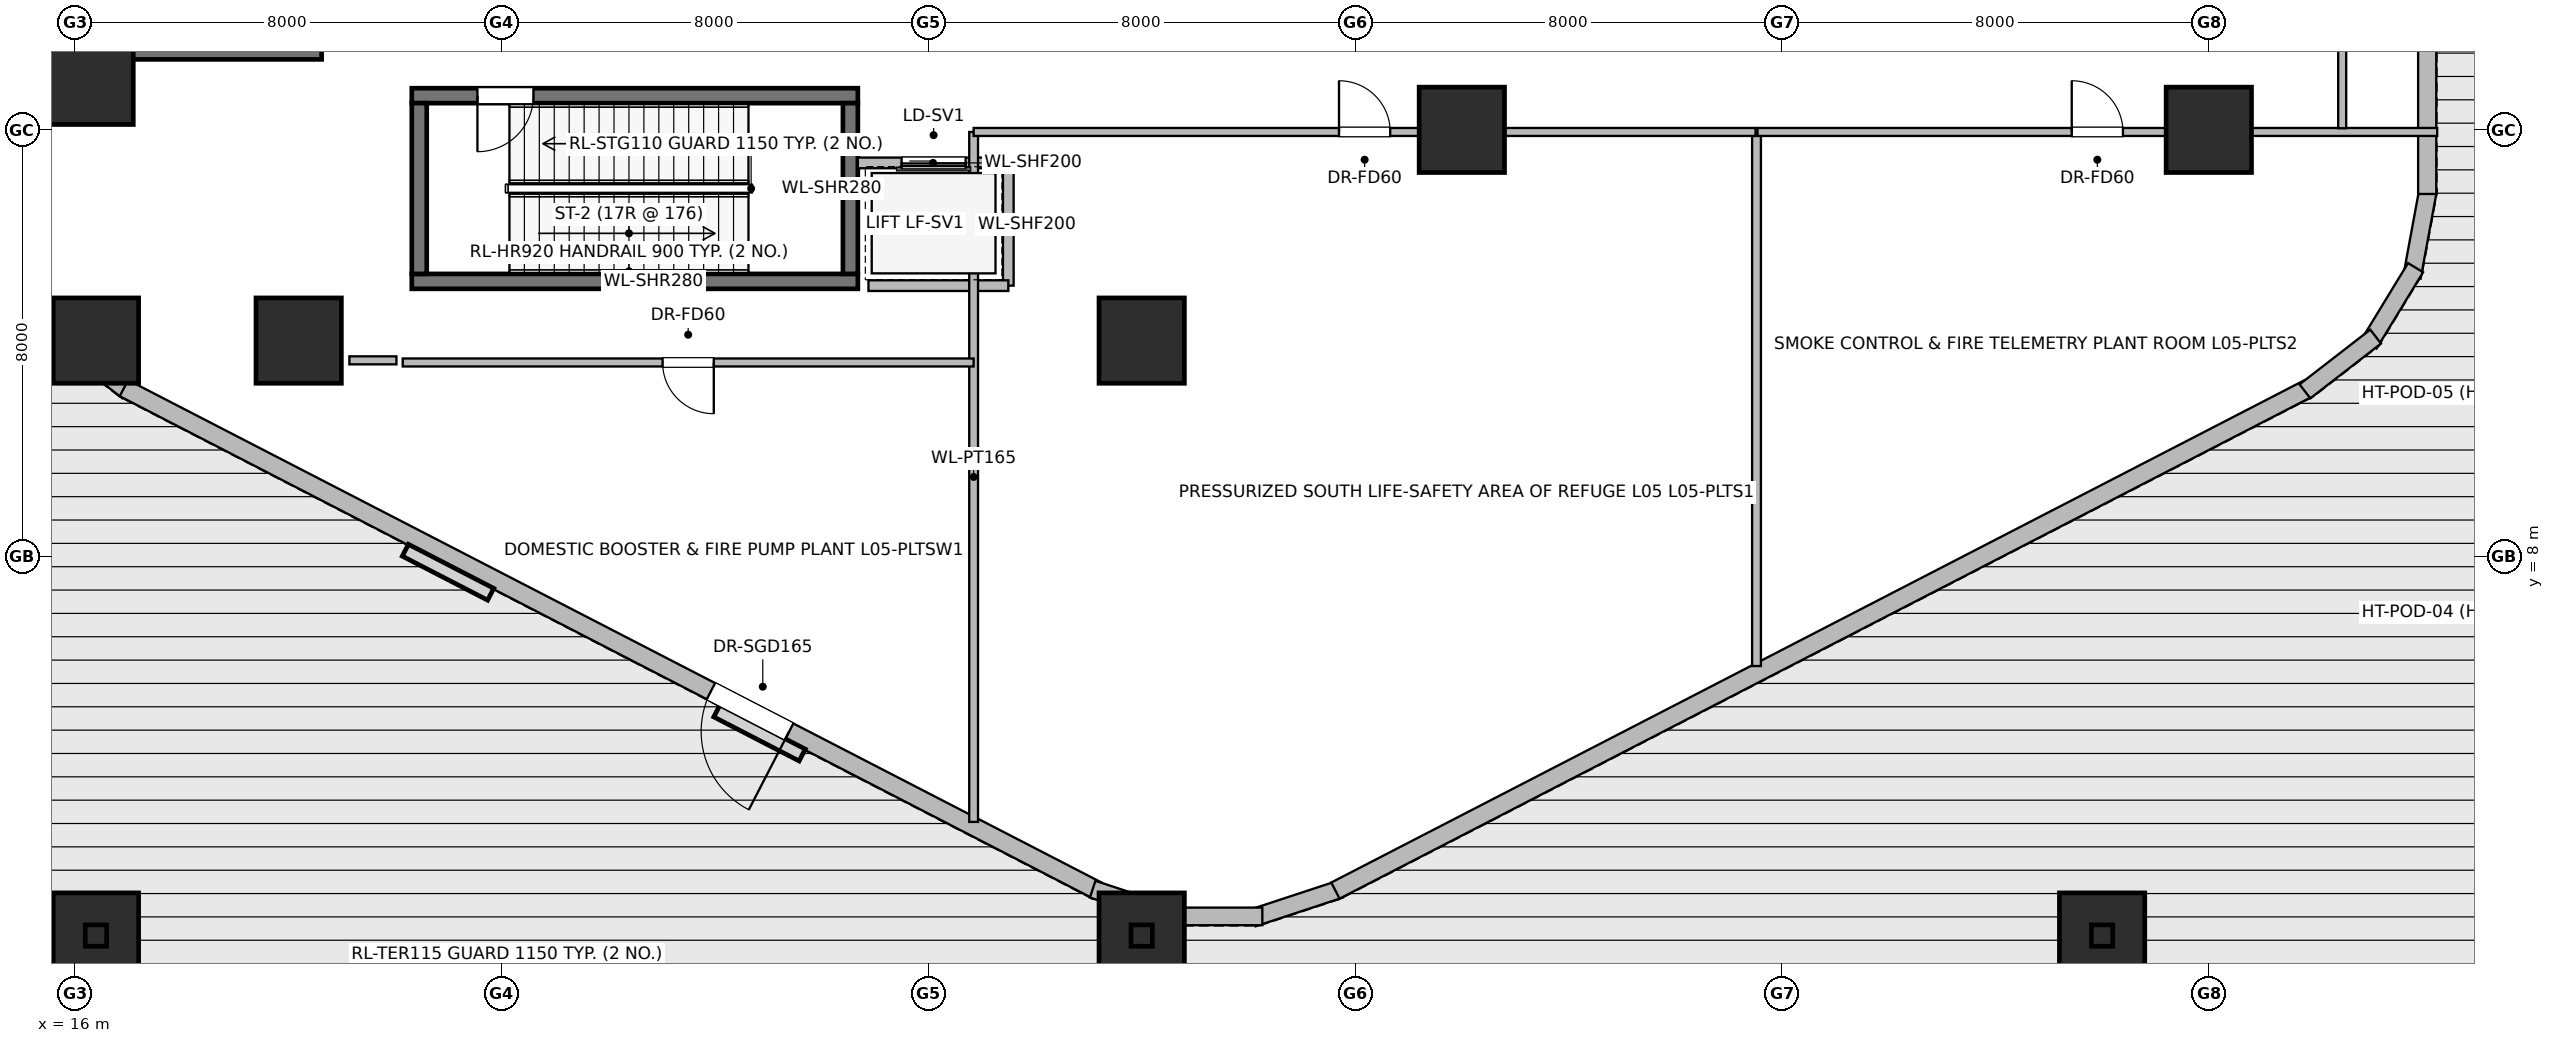
"""IFC4 building model, lengths in metres.
Left out: names, types, materials, properties, quantities, classifications, styles, units other than length and angle.
Written with IfcOpenShell. Run it as: python <this file> out.ifc"""

import sys

from ifc_helpers import new_model, si_unit, direction, frame, frame_2d, origin, origin_2d, place, context, subcontext, project, spatial, rectangle, hollow_rectangle, extrude, element, fill, save


model = new_model("IFC4")
c1 = context("Model", 3, precision=1e-05, world=origin(), true_north=direction((0.0, 1.0)))
c2 = subcontext(c1, "Body", "Model", "MODEL_VIEW")
j1 = project(units=[si_unit("LENGTHUNIT", "METRE"), si_unit("PLANEANGLEUNIT", "RADIAN")], contexts=[c1])
p1 = place(None, origin())
s1 = spatial("IfcSite", under=j1, at=p1, CompositionType="ELEMENT")
p2 = place(p1, origin())
s2 = spatial("IfcBuilding", under=s1, at=p2, CompositionType="ELEMENT")
p3 = place(p2, frame((0.0, 0.0, 21.0)))
s3 = spatial("IfcBuildingStorey", under=s2, at=p3, CompositionType="ELEMENT", Elevation=21.0)
p4 = place(p3, frame((16.87, 17.46, 0.0), z_axis=(0.0, 0.0, 1.0), x_axis=(1.0, 0.0, 0.0)))
e1 = element("IfcWall", 1, at=p4, inside=s3, PredefinedType="SHEAR", context=c2, shape_type="SweptSolid", body=[
    extrude(rectangle(XDim=3.76, YDim=0.28, at=frame_2d((1.88, 0.0))), origin(), (0.0, 0.0, 1.0), 6.0),
])
p5 = place(p3, frame((22.32, 13.16, 0.0), z_axis=(0.0, 0.0, 1.0), x_axis=(1.0, 0.0, 0.0)))
e2 = element("IfcWall", 2, at=p5, inside=s3, PredefinedType="SHEAR", context=c2, shape_type="SweptSolid", body=[
    extrude(rectangle(XDim=8.36, YDim=0.28, at=frame_2d((4.18, 0.0))), origin(), (0.0, 0.0, 1.0), 6.0),
])
p6 = place(p3, frame((30.68, 16.64, 0.0), z_axis=(0.0, 0.0, 1.0), x_axis=(-1.0, 0.0, 0.0)))
e3 = element("IfcWall", 3, at=p6, inside=s3, PredefinedType="SHEAR", context=c2, shape_type="SweptSolid", body=[
    extrude(rectangle(XDim=8.36, YDim=0.28, at=frame_2d((4.18, 0.0))), origin(), (0.0, 0.0, 1.0), 6.0),
])
p7 = place(p6, frame((6.08, 0.0, 0.0)))
e4 = element("IfcOpeningElement", 4, at=p7, cuts=e3, PredefinedType="OPENING", context=c2, shape_type="SweptSolid", body=[
    extrude(rectangle(XDim=1.05, YDim=2.0, at=frame_2d((0.525, 1.0))), frame((0.0, 0.15, 0.0), z_axis=(0.0, -1.0, 0.0), x_axis=(1.0, 0.0, 0.0)), (0.0, 0.0, 1.0), 0.3),
])
for number, where, z_axis, x_axis in (
    (5, (22.46, 16.5, 0.0), (0.0, 0.0, 1.0), (0.0, -1.0, 0.0)),
    (6, (30.54, 13.3, 0.0), (0.0, 0.0, 1.0), (0.0, 1.0, 0.0)),
):
    element("IfcWall", number, at=place(p3, frame(where, z_axis=z_axis, x_axis=x_axis)), inside=s3, PredefinedType="SHEAR", context=c2, shape_type="SweptSolid", body=[
        extrude(rectangle(XDim=3.2, YDim=0.28, at=frame_2d((1.6, 0.0))), origin(), (0.0, 0.0, 1.0), 6.0),
    ])
p8 = place(p3, frame((16.3, 16.9, 0.0), z_axis=(0.0, 0.0, 1.0), x_axis=(1.0, 0.0, 0.0)))
e7 = element("IfcColumn", 7, at=p8, inside=s3, PredefinedType="COLUMN", context=c2, shape_type="SweptSolid", body=[
    extrude(rectangle(XDim=1.6, YDim=1.6, at=origin_2d()), origin(), (0.0, 0.0, 1.0), 6.0),
])
for number, where, z_axis, x_axis in (
    (8, (16.4, 0.9, 0.0), (0.0, 0.0, 1.0), (1.0, 0.0, 0.0)),
    (9, (36.0, 0.9, 0.0), (0.0, 0.0, 1.0), (1.0, 0.0, 0.0)),
    (10, (54.0, 0.9, 0.0), (0.0, 0.0, 1.0), (1.0, 0.0, 0.0)),
    (11, (42.0, 16.0, 0.0), (0.0, 0.0, 1.0), (1.0, 0.0, 0.0)),
    (12, (56.0, 16.0, 0.0), (0.0, 0.0, 1.0), (1.0, 0.0, 0.0)),
    (13, (20.2, 12.05, 0.0), (0.0, 0.0, 1.0), (1.0, 0.0, 0.0)),
    (14, (16.4, 12.05, 0.0), (0.0, 0.0, 1.0), (1.0, 0.0, 0.0)),
    (15, (36.0, 12.05, 0.0), (0.0, 0.0, 1.0), (1.0, 0.0, 0.0)),
):
    element("IfcColumn", number, at=place(p3, frame(where, z_axis=z_axis, x_axis=x_axis)), inside=s3, PredefinedType="COLUMN", context=c2, shape_type="SweptSolid", body=[
        extrude(rectangle(XDim=1.6, YDim=1.6, at=origin_2d()), origin(), (0.0, 0.0, 1.0), 5.5),
    ])
for number, where, z_axis, x_axis in (
    (16, (16.4, 0.9, 5.55), (0.0, 0.0, 1.0), (1.0, 0.0, 0.0)),
    (17, (36.0, 0.9, 5.55), (0.0, 0.0, 1.0), (1.0, 0.0, 0.0)),
    (18, (54.0, 0.9, 5.55), (0.0, 0.0, 1.0), (1.0, 0.0, 0.0)),
):
    element("IfcColumn", number, at=place(p3, frame(where, z_axis=z_axis, x_axis=x_axis)), inside=s3, PredefinedType="USERDEFINED", context=c2, shape_type="SweptSolid", body=[
        extrude(hollow_rectangle(XDim=0.4, YDim=0.4, WallThickness=0.022, at=origin_2d()), origin(), (0.0, 0.0, 1.0), 3.25),
    ])
p9 = place(p3, frame((16.998, 11.099, 0.0), z_axis=(0.0, 0.0, 1.0), x_axis=(-0.790691856293, 0.61221433207, 0.0)))
e19 = element("IfcWall", 19, at=p9, inside=s3, PredefinedType="STANDARD", context=c2, shape_type="SweptSolid", body=[
    extrude(rectangle(XDim=1.676, YDim=0.33, at=frame_2d((0.838, 0.0))), origin(), (0.0, 0.0, 1.0), 3.6),
])
p10 = place(p3, frame((15.798, 11.985, 0.0), z_axis=(0.0, 0.0, 1.0), x_axis=(-0.520584129191, 0.853810379671, 0.0)))
e20 = element("IfcWall", 20, at=p10, inside=s3, PredefinedType="STANDARD", context=c2, shape_type="SweptSolid", body=[
    extrude(rectangle(XDim=1.677, YDim=0.33, at=frame_2d((0.838, 0.0))), origin(), (0.0, 0.0, 1.0), 3.6),
])
p11 = place(p3, frame((35.169, 1.743, 0.0), z_axis=(0.0, 0.0, 1.0), x_axis=(-0.888634413993, 0.458616264721, 0.0)))
e21 = element("IfcWall", 21, at=p11, inside=s3, PredefinedType="STANDARD", context=c2, shape_type="SweptSolid", body=[
    extrude(rectangle(XDim=20.531, YDim=0.34, at=frame_2d((10.266, 0.0))), origin(), (0.0, 0.0, 1.0), 3.6),
])
p12 = place(p11, frame((6.5, 0.0, 0.0)))
e22 = element("IfcOpeningElement", 22, at=p12, cuts=e21, PredefinedType="OPENING", context=c2, shape_type="SweptSolid", body=[
    extrude(rectangle(XDim=1.65, YDim=2.25, at=frame_2d((0.825, 1.125))), frame((0.0, 0.18, 0.0), z_axis=(0.0, -1.0, 0.0), x_axis=(1.0, 0.0, 0.0)), (0.0, 0.0, 1.0), 0.36),
])
p13 = place(p3, frame((39.719, 1.769, 0.0), z_axis=(0.0, 0.0, 1.0), x_axis=(-0.94976901097, -0.312951794691, 0.0)))
e23 = element("IfcWall", 23, at=p13, inside=s3, PredefinedType="STANDARD", context=c2, shape_type="SweptSolid", body=[
    extrude(rectangle(XDim=1.722, YDim=0.33, at=frame_2d((0.861, 0.0))), origin(), (0.0, 0.0, 1.0), 3.6),
])
p14 = place(p3, frame((38.261, 1.259, 0.0), z_axis=(0.0, 0.0, 1.0), x_axis=(-1.0, 0.0, 0.0)))
e24 = element("IfcWall", 24, at=p14, inside=s3, PredefinedType="STANDARD", context=c2, shape_type="SweptSolid", body=[
    extrude(rectangle(XDim=1.722, YDim=0.33, at=frame_2d((0.861, 0.0))), origin(), (0.0, 0.0, 1.0), 3.6),
])
p15 = place(p3, frame((36.717, 1.23, 0.0), z_axis=(0.0, 0.0, 1.0), x_axis=(-0.94976901097, 0.312951794691, 0.0)))
e25 = element("IfcWall", 25, at=p15, inside=s3, PredefinedType="STANDARD", context=c2, shape_type="SweptSolid", body=[
    extrude(rectangle(XDim=1.722, YDim=0.33, at=frame_2d((0.861, 0.0))), origin(), (0.0, 0.0, 1.0), 3.6),
])
p16 = place(p3, frame((57.876, 11.159, 0.0), z_axis=(0.0, 0.0, 1.0), x_axis=(-0.888634413993, -0.458616264721, 0.0)))
e26 = element("IfcWall", 26, at=p16, inside=s3, PredefinedType="STANDARD", context=c2, shape_type="SweptSolid", body=[
    extrude(rectangle(XDim=20.531, YDim=0.34, at=frame_2d((10.266, 0.0))), origin(), (0.0, 0.0, 1.0), 3.6),
])
p17 = place(p3, frame((60.113, 14.892, 0.0), z_axis=(0.0, 0.0, 1.0), x_axis=(-0.181714143354, -0.983351397063, 0.0)))
e27 = element("IfcWall", 27, at=p17, inside=s3, PredefinedType="STANDARD", context=c2, shape_type="SweptSolid", body=[
    extrude(rectangle(XDim=1.678, YDim=0.33, at=frame_2d((0.839, 0.0))), origin(), (0.0, 0.0, 1.0), 5.58),
])
p18 = place(p3, frame((59.875, 13.417, 0.0), z_axis=(0.0, 0.0, 1.0), x_axis=(-0.520584129191, -0.853810379671, 0.0)))
e28 = element("IfcWall", 28, at=p18, inside=s3, PredefinedType="STANDARD", context=c2, shape_type="SweptSolid", body=[
    extrude(rectangle(XDim=1.677, YDim=0.33, at=frame_2d((0.838, 0.0))), origin(), (0.0, 0.0, 1.0), 5.58),
])
p19 = place(p3, frame((59.127, 12.125, 0.0), z_axis=(0.0, 0.0, 1.0), x_axis=(-0.790691856293, -0.61221433207, 0.0)))
e29 = element("IfcWall", 29, at=p19, inside=s3, PredefinedType="STANDARD", context=c2, shape_type="SweptSolid", body=[
    extrude(rectangle(XDim=1.676, YDim=0.33, at=frame_2d((0.838, 0.0))), origin(), (0.0, 0.0, 1.0), 5.58),
])
p20 = place(p3, frame((60.093, 33.202, 0.0), z_axis=(0.0, 0.0, 1.0), x_axis=(0.0, -1.0, 0.0)))
e30 = element("IfcWall", 30, at=p20, inside=s3, PredefinedType="STANDARD", context=c2, shape_type="SweptSolid", body=[
    extrude(rectangle(XDim=18.404, YDim=0.34, at=frame_2d((9.202, 0.0))), origin(), (0.0, 0.0, 1.0), 3.6),
])
p21 = place(p3, frame((33.5, 15.38, 0.0), z_axis=(0.0, 0.0, 1.0), x_axis=(-1.0, 0.0, 0.0)))
e31 = element("IfcWall", 31, at=p21, inside=s3, PredefinedType="PARTITIONING", context=c2, shape_type="SweptSolid", body=[
    extrude(rectangle(XDim=2.82, YDim=0.2, at=frame_2d((1.41, 0.0))), origin(), (0.0, 0.0, 1.0), 5.58),
])
p22 = place(p21, frame((0.8, 0.0, 0.0)))
e32 = element("IfcOpeningElement", 32, at=p22, cuts=e31, PredefinedType="OPENING", context=c2, shape_type="SweptSolid", body=[
    extrude(rectangle(XDim=1.2, YDim=2.2, at=frame_2d((0.6, 1.1))), frame((0.0, 0.11, 0.0), z_axis=(0.0, -1.0, 0.0), x_axis=(1.0, 0.0, 0.0)), (0.0, 0.0, 1.0), 0.22),
])
p23 = place(p3, frame((33.5, 13.08, 0.0), z_axis=(0.0, 0.0, 1.0), x_axis=(0.0, 1.0, 0.0)))
e33 = element("IfcWall", 33, at=p23, inside=s3, PredefinedType="PARTITIONING", context=c2, shape_type="SweptSolid", body=[
    extrude(rectangle(XDim=2.3, YDim=0.2, at=frame_2d((1.15, 0.0))), origin(), (0.0, 0.0, 1.0), 5.58),
])
p24 = place(p3, frame((30.879, 13.08, 0.0), z_axis=(0.0, 0.0, 1.0), x_axis=(1.0, 0.0, 0.0)))
e34 = element("IfcWall", 34, at=p24, inside=s3, PredefinedType="PARTITIONING", context=c2, shape_type="SweptSolid", body=[
    extrude(rectangle(XDim=2.621, YDim=0.2, at=frame_2d((1.311, 0.0))), origin(), (0.0, 0.0, 1.0), 5.58),
])
p25 = place(p3, frame((32.85, 3.03, 0.0), z_axis=(0.0, 0.0, 1.0), x_axis=(0.0, 1.0, 0.0)))
e35 = element("IfcWall", 35, at=p25, inside=s3, PredefinedType="PARTITIONING", context=c2, shape_type="SweptSolid", body=[
    extrude(rectangle(XDim=12.93, YDim=0.165, at=frame_2d((6.465, 0.0))), origin(), (0.0, 0.0, 1.0), 5.58),
])
p26 = place(p3, frame((32.85, 11.64, 0.0), z_axis=(0.0, 0.0, 1.0), x_axis=(-1.0, 0.0, 0.0)))
e36 = element("IfcWall", 36, at=p26, inside=s3, PredefinedType="PARTITIONING", context=c2, shape_type="SweptSolid", body=[
    extrude(rectangle(XDim=10.7, YDim=0.15, at=frame_2d((5.35, 0.0))), origin(), (0.0, 0.0, 1.0), 5.58),
])
p27 = place(p26, frame((4.87, 0.0, 0.0)))
e37 = element("IfcOpeningElement", 37, at=p27, cuts=e36, PredefinedType="OPENING", context=c2, shape_type="SweptSolid", body=[
    extrude(rectangle(XDim=0.96, YDim=2.0, at=frame_2d((0.48, 1.0))), frame((0.0, 0.085, 0.0), z_axis=(0.0, -1.0, 0.0), x_axis=(1.0, 0.0, 0.0)), (0.0, 0.0, 1.0), 0.17),
])
p28 = place(p3, frame((47.523, 5.951, 0.0), z_axis=(0.0, 0.0, 1.0), x_axis=(0.0, 1.0, 0.0)))
e38 = element("IfcWall", 38, at=p28, inside=s3, PredefinedType="PARTITIONING", context=c2, shape_type="SweptSolid", body=[
    extrude(rectangle(XDim=9.979, YDim=0.165, at=frame_2d((4.99, 0.0))), origin(), (0.0, 0.0, 1.0), 5.58),
])
p29 = place(p3, frame((32.85, 15.96, 0.0), z_axis=(0.0, 0.0, 1.0), x_axis=(1.0, 0.0, 0.0)))
e39 = element("IfcWall", 39, at=p29, inside=s3, PredefinedType="PARTITIONING", context=c2, shape_type="SweptSolid", body=[
    extrude(rectangle(XDim=14.655, YDim=0.15, at=frame_2d((7.327, 0.0))), origin(), (0.0, 0.0, 1.0), 3.6),
])
p30 = place(p29, frame((6.848, 0.0, 0.0)))
e40 = element("IfcOpeningElement", 40, at=p30, cuts=e39, PredefinedType="OPENING", context=c2, shape_type="SweptSolid", body=[
    extrude(rectangle(XDim=0.96, YDim=2.0, at=frame_2d((0.48, 1.0))), frame((0.0, 0.085, 0.0), z_axis=(0.0, -1.0, 0.0), x_axis=(1.0, 0.0, 0.0)), (0.0, 0.0, 1.0), 0.17),
])
p31 = place(p3, frame((47.541, 15.96, 0.0), z_axis=(0.0, 0.0, 1.0), x_axis=(1.0, 0.0, 0.0)))
e41 = element("IfcWall", 41, at=p31, inside=s3, PredefinedType="PARTITIONING", context=c2, shape_type="SweptSolid", body=[
    extrude(rectangle(XDim=12.739, YDim=0.15, at=frame_2d((6.37, 0.0))), origin(), (0.0, 0.0, 1.0), 3.6),
])
p32 = place(p31, frame((5.89, 0.0, 0.0)))
e42 = element("IfcOpeningElement", 42, at=p32, cuts=e41, PredefinedType="OPENING", context=c2, shape_type="SweptSolid", body=[
    extrude(rectangle(XDim=0.96, YDim=2.0, at=frame_2d((0.48, 1.0))), frame((0.0, 0.085, 0.0), z_axis=(0.0, -1.0, 0.0), x_axis=(1.0, 0.0, 0.0)), (0.0, 0.0, 1.0), 0.17),
])
p33 = place(p3, frame((22.032, 11.68, 0.0), z_axis=(0.0, 0.0, 1.0), x_axis=(-1.0, 0.0, 0.0)))
e43 = element("IfcWall", 43, at=p33, inside=s3, PredefinedType="PARTITIONING", context=c2, shape_type="SweptSolid", body=[
    extrude(rectangle(XDim=0.882, YDim=0.15, at=frame_2d((0.441, 0.0))), origin(), (0.0, 0.0, 1.0), 5.58),
])
p34 = place(p3, frame((58.5, 18.242, 0.0), z_axis=(0.0, 0.0, 1.0), x_axis=(0.0, -1.0, 0.0)))
e44 = element("IfcWall", 44, at=p34, inside=s3, PredefinedType="PARTITIONING", context=c2, shape_type="SweptSolid", body=[
    extrude(rectangle(XDim=2.212, YDim=0.15, at=frame_2d((1.106, 0.0))), origin(), (0.0, 0.0, 1.0), 5.58),
])
p35 = place(p12, origin())
e45 = element("IfcDoor", 45, at=p35, inside=s3, OperationType="SINGLE_SWING_LEFT", PredefinedType="DOOR", context=c2, shape_type="SweptSolid", body=[
    extrude(rectangle(XDim=1.65, YDim=2.25, at=frame_2d((0.825, 1.125))), frame((0.0, 0.025, 0.0), z_axis=(0.0, -1.0, 0.0), x_axis=(1.0, 0.0, 0.0)), (0.0, 0.0, 1.0), 0.05),
])
fill(e22, e45)
p36 = place(p7, origin())
e46 = element("IfcDoor", 46, at=p36, inside=s3, OperationType="SINGLE_SWING_RIGHT", PredefinedType="DOOR", context=c2, shape_type="SweptSolid", body=[
    extrude(rectangle(XDim=1.05, YDim=2.0, at=frame_2d((0.525, 1.0))), frame((0.0, 0.025, 0.0), z_axis=(0.0, -1.0, 0.0), x_axis=(1.0, 0.0, 0.0)), (0.0, 0.0, 1.0), 0.05),
])
fill(e4, e46)
p37 = place(p22, origin())
e47 = element("IfcDoor", 47, at=p37, inside=s3, OperationType="SLIDING_TO_RIGHT", PredefinedType="DOOR", context=c2, shape_type="SweptSolid", body=[
    extrude(rectangle(XDim=1.2, YDim=2.2, at=frame_2d((0.6, 1.1))), frame((0.0, 0.025, 0.0), z_axis=(0.0, -1.0, 0.0), x_axis=(1.0, 0.0, 0.0)), (0.0, 0.0, 1.0), 0.05),
])
fill(e32, e47)
p38 = place(p27, origin())
e48 = element("IfcDoor", 48, at=p38, inside=s3, OperationType="SINGLE_SWING_LEFT", PredefinedType="DOOR", context=c2, shape_type="SweptSolid", body=[
    extrude(rectangle(XDim=0.96, YDim=2.0, at=frame_2d((0.48, 1.0))), frame((0.0, 0.025, 0.0), z_axis=(0.0, -1.0, 0.0), x_axis=(1.0, 0.0, 0.0)), (0.0, 0.0, 1.0), 0.05),
])
fill(e37, e48)
p39 = place(p30, origin())
e49 = element("IfcDoor", 49, at=p39, inside=s3, OperationType="SINGLE_SWING_LEFT", PredefinedType="DOOR", context=c2, shape_type="SweptSolid", body=[
    extrude(rectangle(XDim=0.96, YDim=2.0, at=frame_2d((0.48, 1.0))), frame((0.0, 0.025, 0.0), z_axis=(0.0, -1.0, 0.0), x_axis=(1.0, 0.0, 0.0)), (0.0, 0.0, 1.0), 0.05),
])
fill(e40, e49)
p40 = place(p32, origin())
e50 = element("IfcDoor", 50, at=p40, inside=s3, OperationType="SINGLE_SWING_LEFT", PredefinedType="DOOR", context=c2, shape_type="SweptSolid", body=[
    extrude(rectangle(XDim=0.96, YDim=2.0, at=frame_2d((0.48, 1.0))), frame((0.0, 0.025, 0.0), z_axis=(0.0, -1.0, 0.0), x_axis=(1.0, 0.0, 0.0)), (0.0, 0.0, 1.0), 0.05),
])
fill(e42, e50)
save(model, sys.argv[1])
